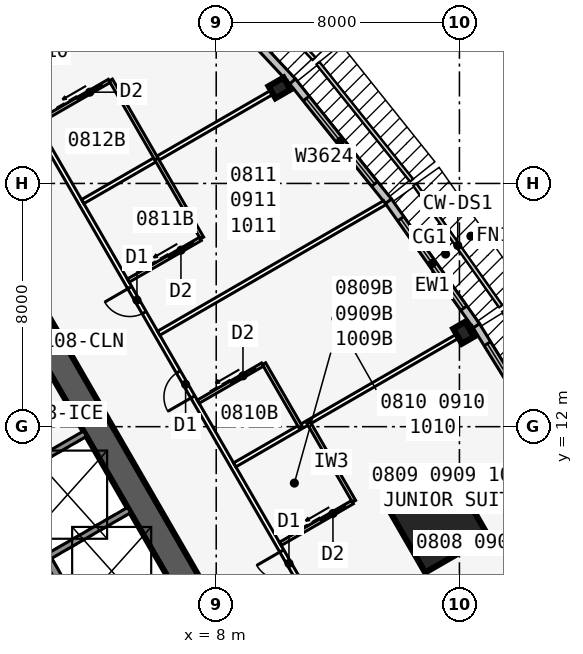
"""IFC4 building model, lengths in metres.
Left out: names, types, materials, properties, quantities, classifications, styles, units other than length and angle.
Written with IfcOpenShell. Run it as: python <this file> out.ifc"""

import sys

from ifc_helpers import new_model, si_unit, direction, frame, frame_2d, origin, origin_2d, place, context, subcontext, project, spatial, rectangle, i_section, extrude, element, fill, save


model = new_model("IFC4")
c1 = context("Model", 3, precision=1e-05, world=origin(), true_north=direction((0.0, 1.0)))
c2 = subcontext(c1, "Body", "Model", "MODEL_VIEW")
j1 = project(units=[si_unit("LENGTHUNIT", "METRE"), si_unit("PLANEANGLEUNIT", "RADIAN")], contexts=[c1])
p1 = place(None, origin())
s1 = spatial("IfcSite", under=j1, at=p1, CompositionType="ELEMENT")
p2 = place(p1, origin())
s2 = spatial("IfcBuilding", under=s1, at=p2, CompositionType="ELEMENT")
p3 = place(p2, frame((0.0, 0.0, 38.7)))
s3 = spatial("IfcBuildingStorey", under=s2, at=p3, CompositionType="ELEMENT", Elevation=38.7)
p4 = place(p3, frame((16.5, -9.526, 0.0), z_axis=(0.0, 0.0, 1.0), x_axis=(-0.499999749417, 0.866025548458, 0.0)))
e1 = element("IfcWall", 1, at=p4, inside=s3, PredefinedType="SHEAR", context=c2, shape_type="SweptSolid", body=[
    extrude(rectangle(XDim=33.0, YDim=0.9, at=frame_2d((16.5, 0.0))), origin(), (0.0, 0.0, 1.0), 3.4),
])
p5 = place(p4, frame((14.15, 0.0, 0.0)))
e2 = element("IfcOpeningElement", 2, at=p5, cuts=e1, PredefinedType="OPENING", context=c2, shape_type="SweptSolid", body=[
    extrude(rectangle(XDim=1.8, YDim=2.13, at=frame_2d((0.9, 1.065))), frame((0.0, 0.46, 0.0), z_axis=(0.0, -1.0, 0.0), x_axis=(1.0, 0.0, 0.0)), (0.0, 0.0, 1.0), 0.92),
])
p6 = place(p4, frame((12.6, 0.0, 0.0)))
e3 = element("IfcOpeningElement", 3, at=p6, cuts=e1, PredefinedType="OPENING", context=c2, shape_type="SweptSolid", body=[
    extrude(rectangle(XDim=1.0, YDim=2.13, at=frame_2d((0.5, 1.065))), frame((0.0, 0.46, 0.0), z_axis=(0.0, -1.0, 0.0), x_axis=(1.0, 0.0, 0.0)), (0.0, 0.0, 1.0), 0.92),
])
p7 = place(p3, frame((5.379, 2.586, 0.0), z_axis=(0.0, 0.0, 1.0), x_axis=(-0.500001375892, 0.866024609411, 0.0)))
e4 = element("IfcWall", 4, at=p7, inside=s3, PredefinedType="SOLIDWALL", context=c2, shape_type="SweptSolid", body=[
    extrude(rectangle(XDim=10.633, YDim=0.25, at=frame_2d((5.316, 0.0))), origin(), (0.0, 0.0, 1.0), 3.235),
])
p8 = place(p7, frame((9.164, 0.0, 0.0)))
e5 = element("IfcOpeningElement", 5, at=p8, cuts=e4, PredefinedType="OPENING", context=c2, shape_type="SweptSolid", body=[
    extrude(rectangle(XDim=0.9, YDim=2.13, at=frame_2d((0.45, 1.065))), frame((0.0, 0.135, 0.0), z_axis=(0.0, -1.0, 0.0), x_axis=(1.0, 0.0, 0.0)), (0.0, 0.0, 1.0), 0.27),
])
p9 = place(p7, frame((1.0, 0.0, 0.0)))
e6 = element("IfcOpeningElement", 6, at=p9, cuts=e4, PredefinedType="OPENING", context=c2, shape_type="SweptSolid", body=[
    extrude(rectangle(XDim=1.1, YDim=2.13, at=frame_2d((0.55, 1.065))), frame((0.0, 0.135, 0.0), z_axis=(0.0, -1.0, 0.0), x_axis=(1.0, 0.0, 0.0)), (0.0, 0.0, 1.0), 0.27),
])
p10 = place(p7, frame((3.9, 0.0, 0.0)))
e7 = element("IfcOpeningElement", 7, at=p10, cuts=e4, PredefinedType="OPENING", context=c2, shape_type="SweptSolid", body=[
    extrude(rectangle(XDim=1.1, YDim=2.13, at=frame_2d((0.55, 1.065))), frame((0.0, 0.135, 0.0), z_axis=(0.0, -1.0, 0.0), x_axis=(1.0, 0.0, 0.0)), (0.0, 0.0, 1.0), 0.27),
])
p11 = place(p7, frame((6.8, 0.0, 0.0)))
e8 = element("IfcOpeningElement", 8, at=p11, cuts=e4, PredefinedType="OPENING", context=c2, shape_type="SweptSolid", body=[
    extrude(rectangle(XDim=1.1, YDim=2.13, at=frame_2d((0.55, 1.065))), frame((0.0, 0.135, 0.0), z_axis=(0.0, -1.0, 0.0), x_axis=(1.0, 0.0, 0.0)), (0.0, 0.0, 1.0), 0.27),
])
for number, where, z_axis, x_axis in (
    (9, (2.429, 7.696, 0.0), (0.0, 0.0, 1.0), (0.866, 0.5, 0.0)),
    (10, (0.979, 10.207, 0.0), (0.0, 0.0, 1.0), (0.866, 0.5, 0.0)),
):
    element("IfcWall", number, at=place(p3, frame(where, z_axis=z_axis, x_axis=x_axis)), inside=s3, PredefinedType="SOLIDWALL", context=c2, shape_type="SweptSolid", body=[
        extrude(rectangle(XDim=3.125, YDim=0.2, at=frame_2d((1.562, 0.0))), origin(), (0.0, 0.0, 1.0), 3.235),
    ])
for number, where, z_axis, x_axis in (
    (11, (16.137, 15.09, 0.0), (0.0, 0.0, 1.0), (0.866, 0.5, 0.0)),
    (12, (10.083, 23.142, 0.0), (0.0, 0.0, 1.0), (-0.5, 0.866, 0.0)),
):
    element("IfcColumn", number, at=place(p3, frame(where, z_axis=z_axis, x_axis=x_axis)), inside=s3, PredefinedType="COLUMN", context=c2, shape_type="SweptSolid", body=[
        extrude(i_section(OverallWidth=0.455, OverallDepth=0.569, WebThickness=0.078, FlangeThickness=0.125, at=origin_2d()), origin(), (0.0, 0.0, 1.0), 3.4),
    ])
p12 = place(p3, frame((15.312, 8.84, 0.0), z_axis=(0.0, 0.0, 1.0), x_axis=(0.866025403784, 0.5, 0.0)))
e13 = element("IfcColumn", 13, at=p12, inside=s3, PredefinedType="COLUMN", context=c2, shape_type="SweptSolid", body=[
    extrude(rectangle(XDim=2.4, YDim=2.4, at=origin_2d()), origin(), (0.0, 0.0, 1.0), 3.4),
])
p13 = place(p3, frame((19.182, 11.071, 0.0), z_axis=(0.0, 0.0, 1.0), x_axis=(-0.526132807704, 0.850402415717, 0.0)))
e14 = element("IfcWall", 14, at=p13, inside=s3, PredefinedType="STANDARD", context=c2, shape_type="SweptSolid", body=[
    extrude(rectangle(XDim=5.002, YDim=0.25, at=frame_2d((2.501, 0.0))), origin(), (0.0, 0.0, 1.0), 3.235),
])
p14 = place(p13, frame((0.701, 0.0, 0.45)))
e15 = element("IfcOpeningElement", 15, at=p14, cuts=e14, PredefinedType="OPENING", context=c2, shape_type="SweptSolid", body=[
    extrude(rectangle(XDim=3.6, YDim=2.4, at=frame_2d((1.8, 1.2))), frame((0.0, 0.135, 0.0), z_axis=(0.0, -1.0, 0.0), x_axis=(1.0, 0.0, 0.0)), (0.0, 0.0, 1.0), 0.27),
])
p15 = place(p3, frame((16.555, 15.318, 0.0), z_axis=(0.0, 0.0, 1.0), x_axis=(-0.5766431066, 0.81699616132, 0.0)))
e16 = element("IfcWall", 16, at=p15, inside=s3, PredefinedType="STANDARD", context=c2, shape_type="SweptSolid", body=[
    extrude(rectangle(XDim=5.021, YDim=0.25, at=frame_2d((2.51, 0.0))), origin(), (0.0, 0.0, 1.0), 3.235),
])
p16 = place(p15, frame((0.71, 0.0, 0.45)))
e17 = element("IfcOpeningElement", 17, at=p16, cuts=e16, PredefinedType="OPENING", context=c2, shape_type="SweptSolid", body=[
    extrude(rectangle(XDim=3.6, YDim=2.4, at=frame_2d((1.8, 1.2))), frame((0.0, 0.135, 0.0), z_axis=(0.0, -1.0, 0.0), x_axis=(1.0, 0.0, 0.0)), (0.0, 0.0, 1.0), 0.27),
])
p17 = place(p3, frame((13.664, 19.414, 0.0), z_axis=(0.0, 0.0, 1.0), x_axis=(-0.624594965756, 0.780948864364, 0.0)))
e18 = element("IfcWall", 18, at=p17, inside=s3, PredefinedType="STANDARD", context=c2, shape_type="SweptSolid", body=[
    extrude(rectangle(XDim=5.058, YDim=0.25, at=frame_2d((2.529, 0.0))), origin(), (0.0, 0.0, 1.0), 3.235),
])
p18 = place(p17, frame((0.729, 0.0, 0.45)))
e19 = element("IfcOpeningElement", 19, at=p18, cuts=e18, PredefinedType="OPENING", context=c2, shape_type="SweptSolid", body=[
    extrude(rectangle(XDim=3.6, YDim=2.4, at=frame_2d((1.8, 1.2))), frame((0.0, 0.135, 0.0), z_axis=(0.0, -1.0, 0.0), x_axis=(1.0, 0.0, 0.0)), (0.0, 0.0, 1.0), 0.27),
])
p19 = place(p3, frame((10.511, 23.357, 0.0), z_axis=(0.0, 0.0, 1.0), x_axis=(-0.682289646561, 0.731081964075, 0.0)))
e20 = element("IfcWall", 20, at=p19, inside=s3, PredefinedType="STANDARD", context=c2, shape_type="SweptSolid", body=[
    extrude(rectangle(XDim=8.211, YDim=0.25, at=frame_2d((4.105, 0.0))), origin(), (0.0, 0.0, 1.0), 3.235),
])
p20 = place(p19, frame((2.006, 0.0, 0.45)))
e21 = element("IfcOpeningElement", 21, at=p20, cuts=e20, PredefinedType="OPENING", context=c2, shape_type="SweptSolid", body=[
    extrude(rectangle(XDim=4.2, YDim=2.4, at=frame_2d((2.1, 1.2))), frame((0.0, 0.135, 0.0), z_axis=(0.0, -1.0, 0.0), x_axis=(1.0, 0.0, 0.0)), (0.0, 0.0, 1.0), 0.27),
])
p21 = place(p3, frame((21.586, -11.885, 0.0), z_axis=(0.0, 0.0, 1.0), x_axis=(-0.500001915564, 0.86602429783, 0.0)))
e22 = element("IfcWall", 22, at=p21, inside=s3, PredefinedType="PARTITIONING", context=c2, shape_type="SweptSolid", body=[
    extrude(rectangle(XDim=42.172, YDim=0.15, at=frame_2d((21.086, 0.0))), origin(), (0.0, 0.0, 1.0), 3.235),
])
p22 = place(p21, frame((1.911, 0.0, 0.0)))
e23 = element("IfcOpeningElement", 23, at=p22, cuts=e22, PredefinedType="OPENING", context=c2, shape_type="SweptSolid", body=[
    extrude(rectangle(XDim=0.95, YDim=2.13, at=frame_2d((0.475, 1.065))), frame((0.0, 0.085, 0.0), z_axis=(0.0, -1.0, 0.0), x_axis=(1.0, 0.0, 0.0)), (0.0, 0.0, 1.0), 0.17),
])
p23 = place(p21, frame((7.511, 0.0, 0.0)))
e24 = element("IfcOpeningElement", 24, at=p23, cuts=e22, PredefinedType="OPENING", context=c2, shape_type="SweptSolid", body=[
    extrude(rectangle(XDim=0.95, YDim=2.13, at=frame_2d((0.475, 1.065))), frame((0.0, 0.085, 0.0), z_axis=(0.0, -1.0, 0.0), x_axis=(1.0, 0.0, 0.0)), (0.0, 0.0, 1.0), 0.17),
])
p24 = place(p21, frame((13.711, 0.0, 0.0)))
e25 = element("IfcOpeningElement", 25, at=p24, cuts=e22, PredefinedType="OPENING", context=c2, shape_type="SweptSolid", body=[
    extrude(rectangle(XDim=0.95, YDim=2.13, at=frame_2d((0.475, 1.065))), frame((0.0, 0.085, 0.0), z_axis=(0.0, -1.0, 0.0), x_axis=(1.0, 0.0, 0.0)), (0.0, 0.0, 1.0), 0.17),
])
p25 = place(p21, frame((21.911, 0.0, 0.0)))
e26 = element("IfcOpeningElement", 26, at=p25, cuts=e22, PredefinedType="OPENING", context=c2, shape_type="SweptSolid", body=[
    extrude(rectangle(XDim=0.95, YDim=2.13, at=frame_2d((0.475, 1.065))), frame((0.0, 0.085, 0.0), z_axis=(0.0, -1.0, 0.0), x_axis=(1.0, 0.0, 0.0)), (0.0, 0.0, 1.0), 0.17),
])
p26 = place(p21, frame((28.711, 0.0, 0.0)))
e27 = element("IfcOpeningElement", 27, at=p26, cuts=e22, PredefinedType="OPENING", context=c2, shape_type="SweptSolid", body=[
    extrude(rectangle(XDim=0.95, YDim=2.13, at=frame_2d((0.475, 1.065))), frame((0.0, 0.085, 0.0), z_axis=(0.0, -1.0, 0.0), x_axis=(1.0, 0.0, 0.0)), (0.0, 0.0, 1.0), 0.17),
])
p27 = place(p21, frame((31.911, 0.0, 0.0)))
e28 = element("IfcOpeningElement", 28, at=p27, cuts=e22, PredefinedType="OPENING", context=c2, shape_type="SweptSolid", body=[
    extrude(rectangle(XDim=0.95, YDim=2.13, at=frame_2d((0.475, 1.065))), frame((0.0, 0.085, 0.0), z_axis=(0.0, -1.0, 0.0), x_axis=(1.0, 0.0, 0.0)), (0.0, 0.0, 1.0), 0.17),
])
p28 = place(p21, frame((39.311, 0.0, 0.0)))
e29 = element("IfcOpeningElement", 29, at=p28, cuts=e22, PredefinedType="OPENING", context=c2, shape_type="SweptSolid", body=[
    extrude(rectangle(XDim=0.95, YDim=2.13, at=frame_2d((0.475, 1.065))), frame((0.0, 0.085, 0.0), z_axis=(0.0, -1.0, 0.0), x_axis=(1.0, 0.0, 0.0)), (0.0, 0.0, 1.0), 0.17),
])
p29 = place(p3, frame((8.608, 10.743, 0.0), z_axis=(0.0, 0.0, 1.0), x_axis=(0.866028232062, 0.499995101247, 0.0)))
e30 = element("IfcWall", 30, at=p29, inside=s3, PredefinedType="PARTITIONING", context=c2, shape_type="SweptSolid", body=[
    extrude(rectangle(XDim=9.043, YDim=0.15, at=frame_2d((4.521, 0.0))), origin(), (0.0, 0.0, 1.0), 2.389),
])
p30 = place(p3, frame((6.108, 15.073, 0.0), z_axis=(0.0, 0.0, 1.0), x_axis=(0.866031196456, 0.499989966665, 0.0)))
e31 = element("IfcWall", 31, at=p30, inside=s3, PredefinedType="PARTITIONING", context=c2, shape_type="SweptSolid", body=[
    extrude(rectangle(XDim=8.585, YDim=0.15, at=frame_2d((4.292, 0.0))), origin(), (0.0, 0.0, 1.0), 2.389),
])
p31 = place(p3, frame((3.608, 19.404, 0.0), z_axis=(0.0, 0.0, 1.0), x_axis=(0.866021300503, 0.500007107024, 0.0)))
e32 = element("IfcWall", 32, at=p31, inside=s3, PredefinedType="PARTITIONING", context=c2, shape_type="SweptSolid", body=[
    extrude(rectangle(XDim=7.82, YDim=0.15, at=frame_2d((3.91, 0.0))), origin(), (0.0, 0.0, 1.0), 2.389),
])
p32 = place(p3, frame((12.533, 9.545, 0.0), z_axis=(0.0, 0.0, 1.0), x_axis=(-0.499990139034, 0.866031096941, 0.0)))
e33 = element("IfcWall", 33, at=p32, inside=s3, PredefinedType="PLUMBINGWALL", context=c2, shape_type="SweptSolid", body=[
    extrude(rectangle(XDim=3.0, YDim=0.12, at=frame_2d((1.5, 0.0))), origin(), (0.0, 0.0, 1.0), 3.235),
])
p33 = place(p3, frame((10.108, 8.145, 0.0), z_axis=(0.0, 0.0, 1.0), x_axis=(0.866035715982, 0.499982138324, 0.0)))
e34 = element("IfcWall", 34, at=p33, inside=s3, PredefinedType="PLUMBINGWALL", context=c2, shape_type="SweptSolid", body=[
    extrude(rectangle(XDim=2.74, YDim=0.12, at=frame_2d((1.37, 0.0))), origin(), (0.0, 0.0, 1.0), 3.235),
])
p34 = place(p33, frame((1.55, 0.0, 0.0)))
e35 = element("IfcOpeningElement", 35, at=p34, cuts=e34, PredefinedType="OPENING", context=c2, shape_type="SweptSolid", body=[
    extrude(rectangle(XDim=0.9, YDim=2.13, at=frame_2d((0.45, 1.065))), frame((0.0, 0.07, 0.0), z_axis=(0.0, -1.0, 0.0), x_axis=(1.0, 0.0, 0.0)), (0.0, 0.0, 1.0), 0.14),
])
p35 = place(p3, frame((10.773, 11.993, 0.0), z_axis=(0.0, 0.0, 1.0), x_axis=(-0.500001309137, 0.866024647952, 0.0)))
e36 = element("IfcWall", 36, at=p35, inside=s3, PredefinedType="PLUMBINGWALL", context=c2, shape_type="SweptSolid", body=[
    extrude(rectangle(XDim=2.4, YDim=0.12, at=frame_2d((1.2, 0.0))), origin(), (0.0, 0.0, 1.0), 3.235),
])
p36 = place(p3, frame((7.408, 12.822, 0.0), z_axis=(0.0, 0.0, 1.0), x_axis=(0.866023955769, 0.500002508028, 0.0)))
e37 = element("IfcWall", 37, at=p36, inside=s3, PredefinedType="PLUMBINGWALL", context=c2, shape_type="SweptSolid", body=[
    extrude(rectangle(XDim=2.44, YDim=0.12, at=frame_2d((1.22, 0.0))), origin(), (0.0, 0.0, 1.0), 3.235),
])
p37 = place(p36, frame((1.25, 0.0, 0.0)))
e38 = element("IfcOpeningElement", 38, at=p37, cuts=e37, PredefinedType="OPENING", context=c2, shape_type="SweptSolid", body=[
    extrude(rectangle(XDim=0.9, YDim=2.13, at=frame_2d((0.45, 1.065))), frame((0.0, 0.07, 0.0), z_axis=(0.0, -1.0, 0.0), x_axis=(1.0, 0.0, 0.0)), (0.0, 0.0, 1.0), 0.14),
])
p38 = place(p3, frame((7.533, 18.205, 0.0), z_axis=(0.0, 0.0, 1.0), x_axis=(-0.499990139034, 0.866031096941, 0.0)))
e39 = element("IfcWall", 39, at=p38, inside=s3, PredefinedType="PLUMBINGWALL", context=c2, shape_type="SweptSolid", body=[
    extrude(rectangle(XDim=3.0, YDim=0.12, at=frame_2d((1.5, 0.0))), origin(), (0.0, 0.0, 1.0), 3.235),
])
p39 = place(p3, frame((5.108, 16.805, 0.0), z_axis=(0.0, 0.0, 1.0), x_axis=(0.866035715982, 0.499982138324, 0.0)))
e40 = element("IfcWall", 40, at=p39, inside=s3, PredefinedType="PLUMBINGWALL", context=c2, shape_type="SweptSolid", body=[
    extrude(rectangle(XDim=2.74, YDim=0.12, at=frame_2d((1.37, 0.0))), origin(), (0.0, 0.0, 1.0), 3.235),
])
p40 = place(p39, frame((1.55, 0.0, 0.0)))
e41 = element("IfcOpeningElement", 41, at=p40, cuts=e40, PredefinedType="OPENING", context=c2, shape_type="SweptSolid", body=[
    extrude(rectangle(XDim=0.9, YDim=2.13, at=frame_2d((0.45, 1.065))), frame((0.0, 0.07, 0.0), z_axis=(0.0, -1.0, 0.0), x_axis=(1.0, 0.0, 0.0)), (0.0, 0.0, 1.0), 0.14),
])
p41 = place(p3, frame((6.033, 20.803, 0.0), z_axis=(0.0, 0.0, 1.0), x_axis=(-0.499990139034, 0.866031096941, 0.0)))
e42 = element("IfcWall", 42, at=p41, inside=s3, PredefinedType="PLUMBINGWALL", context=c2, shape_type="SweptSolid", body=[
    extrude(rectangle(XDim=3.0, YDim=0.12, at=frame_2d((1.5, 0.0))), origin(), (0.0, 0.0, 1.0), 3.235),
])
p42 = place(p3, frame((2.108, 22.002, 0.0), z_axis=(0.0, 0.0, 1.0), x_axis=(0.866035715982, 0.499982138324, 0.0)))
e43 = element("IfcWall", 43, at=p42, inside=s3, PredefinedType="PLUMBINGWALL", context=c2, shape_type="SweptSolid", body=[
    extrude(rectangle(XDim=2.74, YDim=0.12, at=frame_2d((1.37, 0.0))), origin(), (0.0, 0.0, 1.0), 3.235),
])
p43 = place(p42, frame((1.55, 0.0, 0.0)))
e44 = element("IfcOpeningElement", 44, at=p43, cuts=e43, PredefinedType="OPENING", context=c2, shape_type="SweptSolid", body=[
    extrude(rectangle(XDim=0.9, YDim=2.13, at=frame_2d((0.45, 1.065))), frame((0.0, 0.07, 0.0), z_axis=(0.0, -1.0, 0.0), x_axis=(1.0, 0.0, 0.0)), (0.0, 0.0, 1.0), 0.14),
])
p44 = place(p14, origin())
e45 = element("IfcWindow", 45, at=p44, inside=s3, PartitioningType="SINGLE_PANEL", PredefinedType="WINDOW", context=c2, shape_type="SweptSolid", body=[
    extrude(rectangle(XDim=3.6, YDim=2.4, at=frame_2d((1.8, 1.2))), frame((0.0, 0.03, 0.0), z_axis=(0.0, -1.0, 0.0), x_axis=(1.0, 0.0, 0.0)), (0.0, 0.0, 1.0), 0.06),
])
fill(e15, e45)
p45 = place(p16, origin())
e46 = element("IfcWindow", 46, at=p45, inside=s3, PartitioningType="SINGLE_PANEL", PredefinedType="WINDOW", context=c2, shape_type="SweptSolid", body=[
    extrude(rectangle(XDim=3.6, YDim=2.4, at=frame_2d((1.8, 1.2))), frame((0.0, 0.03, 0.0), z_axis=(0.0, -1.0, 0.0), x_axis=(1.0, 0.0, 0.0)), (0.0, 0.0, 1.0), 0.06),
])
fill(e17, e46)
p46 = place(p18, origin())
e47 = element("IfcWindow", 47, at=p46, inside=s3, PartitioningType="SINGLE_PANEL", PredefinedType="WINDOW", context=c2, shape_type="SweptSolid", body=[
    extrude(rectangle(XDim=3.6, YDim=2.4, at=frame_2d((1.8, 1.2))), frame((0.0, 0.03, 0.0), z_axis=(0.0, -1.0, 0.0), x_axis=(1.0, 0.0, 0.0)), (0.0, 0.0, 1.0), 0.06),
])
fill(e19, e47)
p47 = place(p34, origin())
e48 = element("IfcDoor", 48, at=p47, inside=s3, OperationType="SLIDING_TO_LEFT", PredefinedType="DOOR", context=c2, shape_type="SweptSolid", body=[
    extrude(rectangle(XDim=0.9, YDim=2.13, at=frame_2d((0.45, 1.065))), frame((0.0, 0.025, 0.0), z_axis=(0.0, -1.0, 0.0), x_axis=(1.0, 0.0, 0.0)), (0.0, 0.0, 1.0), 0.05),
])
fill(e35, e48)
p48 = place(p25, origin())
e49 = element("IfcDoor", 49, at=p48, inside=s3, OperationType="SINGLE_SWING_RIGHT", PredefinedType="DOOR", context=c2, shape_type="SweptSolid", body=[
    extrude(rectangle(XDim=0.95, YDim=2.13, at=frame_2d((0.475, 1.065))), frame((0.0, 0.025, 0.0), z_axis=(0.0, -1.0, 0.0), x_axis=(1.0, 0.0, 0.0)), (0.0, 0.0, 1.0), 0.05),
])
fill(e26, e49)
p49 = place(p37, origin())
e50 = element("IfcDoor", 50, at=p49, inside=s3, OperationType="SLIDING_TO_LEFT", PredefinedType="DOOR", context=c2, shape_type="SweptSolid", body=[
    extrude(rectangle(XDim=0.9, YDim=2.13, at=frame_2d((0.45, 1.065))), frame((0.0, 0.025, 0.0), z_axis=(0.0, -1.0, 0.0), x_axis=(1.0, 0.0, 0.0)), (0.0, 0.0, 1.0), 0.05),
])
fill(e38, e50)
p50 = place(p26, origin())
e51 = element("IfcDoor", 51, at=p50, inside=s3, OperationType="SINGLE_SWING_LEFT", PredefinedType="DOOR", context=c2, shape_type="SweptSolid", body=[
    extrude(rectangle(XDim=0.95, YDim=2.13, at=frame_2d((0.475, 1.065))), frame((0.0, 0.025, 0.0), z_axis=(0.0, -1.0, 0.0), x_axis=(1.0, 0.0, 0.0)), (0.0, 0.0, 1.0), 0.05),
])
fill(e27, e51)
p51 = place(p40, origin())
e52 = element("IfcDoor", 52, at=p51, inside=s3, OperationType="SLIDING_TO_LEFT", PredefinedType="DOOR", context=c2, shape_type="SweptSolid", body=[
    extrude(rectangle(XDim=0.9, YDim=2.13, at=frame_2d((0.45, 1.065))), frame((0.0, 0.025, 0.0), z_axis=(0.0, -1.0, 0.0), x_axis=(1.0, 0.0, 0.0)), (0.0, 0.0, 1.0), 0.05),
])
fill(e41, e52)
p52 = place(p27, origin())
e53 = element("IfcDoor", 53, at=p52, inside=s3, OperationType="SINGLE_SWING_RIGHT", PredefinedType="DOOR", context=c2, shape_type="SweptSolid", body=[
    extrude(rectangle(XDim=0.95, YDim=2.13, at=frame_2d((0.475, 1.065))), frame((0.0, 0.025, 0.0), z_axis=(0.0, -1.0, 0.0), x_axis=(1.0, 0.0, 0.0)), (0.0, 0.0, 1.0), 0.05),
])
fill(e28, e53)
p53 = place(p43, origin())
e54 = element("IfcDoor", 54, at=p53, inside=s3, OperationType="SLIDING_TO_LEFT", PredefinedType="DOOR", context=c2, shape_type="SweptSolid", body=[
    extrude(rectangle(XDim=0.9, YDim=2.13, at=frame_2d((0.45, 1.065))), frame((0.0, 0.025, 0.0), z_axis=(0.0, -1.0, 0.0), x_axis=(1.0, 0.0, 0.0)), (0.0, 0.0, 1.0), 0.05),
])
fill(e44, e54)
save(model, sys.argv[1])
